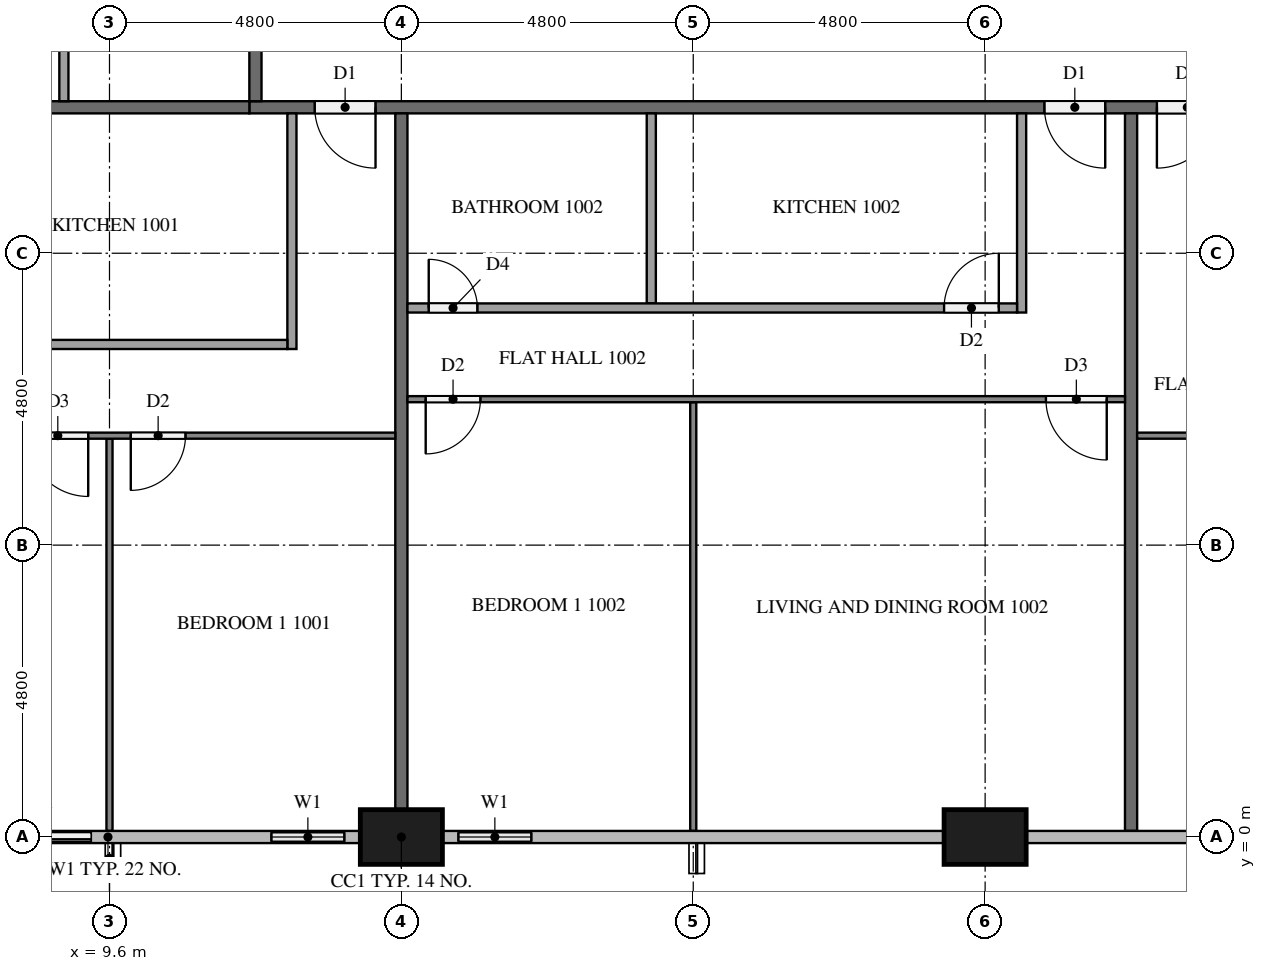
"""IFC4 building model, lengths in metres.
Left out: names, types, materials, properties, quantities, classifications, styles, units other than length and angle.
Written with IfcOpenShell. Run it as: python <this file> out.ifc"""

import sys

from ifc_helpers import new_model, si_unit, direction, frame, frame_2d, origin, origin_2d, place, context, subcontext, project, spatial, rectangle, extrude, element, fill, save


model = new_model("IFC4")
c1 = context("Model", 3, precision=1e-05, world=origin(), true_north=direction((0.0, 1.0)))
c2 = subcontext(c1, "Body", "Model", "MODEL_VIEW")
j1 = project(units=[si_unit("LENGTHUNIT", "METRE"), si_unit("PLANEANGLEUNIT", "RADIAN")], contexts=[c1])
p1 = place(None, origin())
s1 = spatial("IfcSite", under=j1, at=p1, CompositionType="ELEMENT")
p2 = place(p1, origin())
s2 = spatial("IfcBuilding", under=s1, at=p2, CompositionType="ELEMENT")
p3 = place(p2, frame((0.0, 0.0, 43.4)))
s3 = spatial("IfcBuildingStorey", under=s2, at=p3, CompositionType="ELEMENT", Elevation=43.4)
for number, where, z_axis, x_axis in (
    (1, (14.4, 0.0, 0.0), (0.0, 0.0, 1.0), (1.0, 0.0, 0.0)),
    (2, (24.0, 0.0, 0.0), (0.0, 0.0, 1.0), (1.0, 0.0, 0.0)),
):
    element("IfcColumn", number, at=place(p3, frame(where, z_axis=z_axis, x_axis=x_axis)), inside=s3, PredefinedType="COLUMN", context=c2, shape_type="SweptSolid", body=[
        extrude(rectangle(XDim=1.35, YDim=0.9, at=origin_2d()), origin(), (0.0, 0.0, 1.0), 3.2),
    ])
p4 = place(p3, frame((7.2, 0.0, 0.0), z_axis=(0.0, 0.0, 1.0), x_axis=(1.0, 0.0, 0.0)))
e3 = element("IfcWall", 3, at=p4, inside=s3, PredefinedType="SOLIDWALL", context=c2, shape_type="SweptSolid", body=[
    extrude(rectangle(XDim=2.4, YDim=0.15, at=frame_2d((1.2, 0.0))), origin(), (0.0, 0.0, 1.0), 3.2),
])
p5 = place(p4, frame((0.3, 0.0, 0.0)))
e4 = element("IfcOpeningElement", 4, at=p5, cuts=e3, PredefinedType="OPENING", context=c2, shape_type="SweptSolid", body=[
    extrude(rectangle(XDim=1.8, YDim=2.4, at=frame_2d((0.9, 1.2))), frame((0.0, 0.085, 0.0), z_axis=(0.0, -1.0, 0.0), x_axis=(1.0, 0.0, 0.0)), (0.0, 0.0, 1.0), 0.17),
])
p6 = place(p3, frame((12.0, 0.0, 0.0), z_axis=(0.0, 0.0, 1.0), x_axis=(1.0, 0.0, 0.0)))
e5 = element("IfcWall", 5, at=p6, inside=s3, PredefinedType="SOLIDWALL", context=c2, shape_type="SweptSolid", body=[
    extrude(rectangle(XDim=1.725, YDim=0.15, at=frame_2d((0.863, 0.0))), origin(), (0.0, 0.0, 1.0), 3.2),
])
p7 = place(p6, frame((0.262, 0.0, 0.9)))
e6 = element("IfcOpeningElement", 6, at=p7, cuts=e5, PredefinedType="OPENING", context=c2, shape_type="SweptSolid", body=[
    extrude(rectangle(XDim=1.2, YDim=1.4, at=frame_2d((0.6, 0.7))), frame((0.0, 0.085, 0.0), z_axis=(0.0, -1.0, 0.0), x_axis=(1.0, 0.0, 0.0)), (0.0, 0.0, 1.0), 0.17),
])
p8 = place(p3, frame((15.075, 0.0, 0.0), z_axis=(0.0, 0.0, 1.0), x_axis=(1.0, 0.0, 0.0)))
e7 = element("IfcWall", 7, at=p8, inside=s3, PredefinedType="SOLIDWALL", context=c2, shape_type="SweptSolid", body=[
    extrude(rectangle(XDim=1.725, YDim=0.15, at=frame_2d((0.863, 0.0))), origin(), (0.0, 0.0, 1.0), 3.2),
])
p9 = place(p8, frame((0.262, 0.0, 0.9)))
e8 = element("IfcOpeningElement", 8, at=p9, cuts=e7, PredefinedType="OPENING", context=c2, shape_type="SweptSolid", body=[
    extrude(rectangle(XDim=1.2, YDim=1.4, at=frame_2d((0.6, 0.7))), frame((0.0, 0.085, 0.0), z_axis=(0.0, -1.0, 0.0), x_axis=(1.0, 0.0, 0.0)), (0.0, 0.0, 1.0), 0.17),
])
p10 = place(p3, frame((50.5, 12.0, 0.0), z_axis=(0.0, 0.0, 1.0), x_axis=(-1.0, 0.0, 0.0)))
e9 = element("IfcWall", 9, at=p10, inside=s3, PredefinedType="PARTITIONING", context=c2, shape_type="SweptSolid", body=[
    extrude(rectangle(XDim=38.6, YDim=0.2, at=frame_2d((19.3, 0.0))), origin(), (0.0, 0.0, 1.0), 3.2),
])
p11 = place(p10, frame((36.525, 0.0, 0.0)))
e10 = element("IfcOpeningElement", 10, at=p11, cuts=e9, PredefinedType="OPENING", context=c2, shape_type="SweptSolid", body=[
    extrude(rectangle(XDim=1.0, YDim=2.1, at=frame_2d((0.5, 1.05))), frame((0.0, 0.11, 0.0), z_axis=(0.0, -1.0, 0.0), x_axis=(1.0, 0.0, 0.0)), (0.0, 0.0, 1.0), 0.22),
])
p12 = place(p10, frame((24.525, 0.0, 0.0)))
e11 = element("IfcOpeningElement", 11, at=p12, cuts=e9, PredefinedType="OPENING", context=c2, shape_type="SweptSolid", body=[
    extrude(rectangle(XDim=1.0, YDim=2.1, at=frame_2d((0.5, 1.05))), frame((0.0, 0.11, 0.0), z_axis=(0.0, -1.0, 0.0), x_axis=(1.0, 0.0, 0.0)), (0.0, 0.0, 1.0), 0.22),
])
p13 = place(p10, frame((22.675, 0.0, 0.0)))
e12 = element("IfcOpeningElement", 12, at=p13, cuts=e9, PredefinedType="OPENING", context=c2, shape_type="SweptSolid", body=[
    extrude(rectangle(XDim=1.0, YDim=2.1, at=frame_2d((0.5, 1.05))), frame((0.0, 0.11, 0.0), z_axis=(0.0, -1.0, 0.0), x_axis=(1.0, 0.0, 0.0)), (0.0, 0.0, 1.0), 0.22),
])
p14 = place(p10, frame((8.275, 0.0, 0.0)))
e13 = element("IfcOpeningElement", 13, at=p14, cuts=e9, PredefinedType="OPENING", context=c2, shape_type="SweptSolid", body=[
    extrude(rectangle(XDim=1.0, YDim=2.1, at=frame_2d((0.5, 1.05))), frame((0.0, 0.11, 0.0), z_axis=(0.0, -1.0, 0.0), x_axis=(1.0, 0.0, 0.0)), (0.0, 0.0, 1.0), 0.22),
])
p15 = place(p3, frame((12.0, 12.1, 0.0), z_axis=(0.0, 0.0, 1.0), x_axis=(0.0, 1.0, 0.0)))
e14 = element("IfcWall", 14, at=p15, inside=s3, PredefinedType="PARTITIONING", context=c2, shape_type="SweptSolid", body=[
    extrude(rectangle(XDim=28.6, YDim=0.2, at=frame_2d((14.3, 0.0))), origin(), (0.0, 0.0, 1.0), 3.2),
])
p16 = place(p15, frame((26.725, 0.0, 0.0)))
e15 = element("IfcOpeningElement", 15, at=p16, cuts=e14, PredefinedType="OPENING", context=c2, shape_type="SweptSolid", body=[
    extrude(rectangle(XDim=1.0, YDim=2.1, at=frame_2d((0.5, 1.05))), frame((0.0, 0.11, 0.0), z_axis=(0.0, -1.0, 0.0), x_axis=(1.0, 0.0, 0.0)), (0.0, 0.0, 1.0), 0.22),
])
p17 = place(p15, frame((17.125, 0.0, 0.0)))
e16 = element("IfcOpeningElement", 16, at=p17, cuts=e14, PredefinedType="OPENING", context=c2, shape_type="SweptSolid", body=[
    extrude(rectangle(XDim=1.0, YDim=2.1, at=frame_2d((0.5, 1.05))), frame((0.0, 0.11, 0.0), z_axis=(0.0, -1.0, 0.0), x_axis=(1.0, 0.0, 0.0)), (0.0, 0.0, 1.0), 0.22),
])
p18 = place(p15, frame((15.275, 0.0, 0.0)))
e17 = element("IfcOpeningElement", 17, at=p18, cuts=e14, PredefinedType="OPENING", context=c2, shape_type="SweptSolid", body=[
    extrude(rectangle(XDim=1.0, YDim=2.1, at=frame_2d((0.5, 1.05))), frame((0.0, 0.11, 0.0), z_axis=(0.0, -1.0, 0.0), x_axis=(1.0, 0.0, 0.0)), (0.0, 0.0, 1.0), 0.22),
])
p19 = place(p15, frame((5.675, 0.0, 0.0)))
e18 = element("IfcOpeningElement", 18, at=p19, cuts=e14, PredefinedType="OPENING", context=c2, shape_type="SweptSolid", body=[
    extrude(rectangle(XDim=1.0, YDim=2.1, at=frame_2d((0.5, 1.05))), frame((0.0, 0.11, 0.0), z_axis=(0.0, -1.0, 0.0), x_axis=(1.0, 0.0, 0.0)), (0.0, 0.0, 1.0), 0.22),
])
p20 = place(p3, frame((14.4, 11.9, 0.0), z_axis=(0.0, 0.0, 1.0), x_axis=(0.0, -1.0, 0.0)))
e19 = element("IfcWall", 19, at=p20, inside=s3, PredefinedType="PARTITIONING", context=c2, shape_type="SweptSolid", body=[
    extrude(rectangle(XDim=11.45, YDim=0.2, at=frame_2d((5.725, 0.0))), origin(), (0.0, 0.0, 1.0), 3.2),
])
for number, where, z_axis, x_axis in (
    (20, (0.1, 12.0, 0.0), (0.0, 0.0, 1.0), (1.0, 0.0, 0.0)),
    (21, (26.4, 11.9, 0.0), (0.0, 0.0, 1.0), (0.0, -1.0, 0.0)),
):
    element("IfcWall", number, at=place(p3, frame(where, z_axis=z_axis, x_axis=x_axis)), inside=s3, PredefinedType="PARTITIONING", context=c2, shape_type="SweptSolid", body=[
        extrude(rectangle(XDim=11.8, YDim=0.2, at=frame_2d((5.9, 0.0))), origin(), (0.0, 0.0, 1.0), 3.2),
    ])
p21 = place(p3, frame((9.6, 6.55, 0.0), z_axis=(0.0, 0.0, 1.0), x_axis=(0.0, -1.0, 0.0)))
e22 = element("IfcWall", 22, at=p21, inside=s3, PredefinedType="PARTITIONING", context=c2, shape_type="SweptSolid", body=[
    extrude(rectangle(XDim=6.45, YDim=0.1, at=frame_2d((3.225, 0.0))), origin(), (0.0, 0.0, 1.0), 3.2),
])
p22 = place(p3, frame((14.3, 6.6, 0.0), z_axis=(0.0, 0.0, 1.0), x_axis=(-1.0, 0.0, 0.0)))
e23 = element("IfcWall", 23, at=p22, inside=s3, PredefinedType="PARTITIONING", context=c2, shape_type="SweptSolid", body=[
    extrude(rectangle(XDim=14.2, YDim=0.1, at=frame_2d((7.1, 0.0))), origin(), (0.0, 0.0, 1.0), 3.2),
])
p23 = place(p22, frame((3.45, 0.0, 0.0)))
e24 = element("IfcOpeningElement", 24, at=p23, cuts=e23, PredefinedType="OPENING", context=c2, shape_type="SweptSolid", body=[
    extrude(rectangle(XDim=0.9, YDim=2.1, at=frame_2d((0.45, 1.05))), frame((0.0, 0.06, 0.0), z_axis=(0.0, -1.0, 0.0), x_axis=(1.0, 0.0, 0.0)), (0.0, 0.0, 1.0), 0.12),
])
p24 = place(p22, frame((5.05, 0.0, 0.0)))
e25 = element("IfcOpeningElement", 25, at=p24, cuts=e23, PredefinedType="OPENING", context=c2, shape_type="SweptSolid", body=[
    extrude(rectangle(XDim=1.0, YDim=2.1, at=frame_2d((0.5, 1.05))), frame((0.0, 0.06, 0.0), z_axis=(0.0, -1.0, 0.0), x_axis=(1.0, 0.0, 0.0)), (0.0, 0.0, 1.0), 0.12),
])
p25 = place(p22, frame((12.7, 0.0, 0.0)))
e26 = element("IfcOpeningElement", 26, at=p25, cuts=e23, PredefinedType="OPENING", context=c2, shape_type="SweptSolid", body=[
    extrude(rectangle(XDim=0.9, YDim=2.1, at=frame_2d((0.45, 1.05))), frame((0.0, 0.06, 0.0), z_axis=(0.0, -1.0, 0.0), x_axis=(1.0, 0.0, 0.0)), (0.0, 0.0, 1.0), 0.12),
])
p26 = place(p3, frame((12.6, 11.9, 0.0), z_axis=(0.0, 0.0, 1.0), x_axis=(0.0, -1.0, 0.0)))
e27 = element("IfcWall", 27, at=p26, inside=s3, PredefinedType="PARTITIONING", context=c2, shape_type="SweptSolid", body=[
    extrude(rectangle(XDim=3.875, YDim=0.15, at=frame_2d((1.938, 0.0))), origin(), (0.0, 0.0, 1.0), 3.2),
])
p27 = place(p3, frame((0.1, 8.1, 0.0), z_axis=(0.0, 0.0, 1.0), x_axis=(1.0, 0.0, 0.0)))
e28 = element("IfcWall", 28, at=p27, inside=s3, PredefinedType="PARTITIONING", context=c2, shape_type="SweptSolid", body=[
    extrude(rectangle(XDim=12.425, YDim=0.15, at=frame_2d((6.212, 0.0))), origin(), (0.0, 0.0, 1.0), 3.2),
])
p28 = place(p27, frame((7.015, 0.0, 0.0)))
e29 = element("IfcOpeningElement", 29, at=p28, cuts=e28, PredefinedType="OPENING", context=c2, shape_type="SweptSolid", body=[
    extrude(rectangle(XDim=0.9, YDim=2.1, at=frame_2d((0.45, 1.05))), frame((0.0, 0.085, 0.0), z_axis=(0.0, -1.0, 0.0), x_axis=(1.0, 0.0, 0.0)), (0.0, 0.0, 1.0), 0.17),
])
p29 = place(p27, frame((5.465, 0.0, 0.0)))
e30 = element("IfcOpeningElement", 30, at=p29, cuts=e28, PredefinedType="OPENING", context=c2, shape_type="SweptSolid", body=[
    extrude(rectangle(XDim=0.9, YDim=2.1, at=frame_2d((0.45, 1.05))), frame((0.0, 0.085, 0.0), z_axis=(0.0, -1.0, 0.0), x_axis=(1.0, 0.0, 0.0)), (0.0, 0.0, 1.0), 0.17),
])
p30 = place(p27, frame((0.35, 0.0, 0.0)))
e31 = element("IfcOpeningElement", 31, at=p30, cuts=e28, PredefinedType="OPENING", context=c2, shape_type="SweptSolid", body=[
    extrude(rectangle(XDim=0.8, YDim=2.1, at=frame_2d((0.4, 1.05))), frame((0.0, 0.085, 0.0), z_axis=(0.0, -1.0, 0.0), x_axis=(1.0, 0.0, 0.0)), (0.0, 0.0, 1.0), 0.17),
])
p31 = place(p3, frame((19.2, 7.15, 0.0), z_axis=(0.0, 0.0, 1.0), x_axis=(0.0, -1.0, 0.0)))
e32 = element("IfcWall", 32, at=p31, inside=s3, PredefinedType="PARTITIONING", context=c2, shape_type="SweptSolid", body=[
    extrude(rectangle(XDim=7.05, YDim=0.1, at=frame_2d((3.525, 0.0))), origin(), (0.0, 0.0, 1.0), 3.2),
])
p32 = place(p3, frame((26.3, 7.2, 0.0), z_axis=(0.0, 0.0, 1.0), x_axis=(-1.0, 0.0, 0.0)))
e33 = element("IfcWall", 33, at=p32, inside=s3, PredefinedType="PARTITIONING", context=c2, shape_type="SweptSolid", body=[
    extrude(rectangle(XDim=11.8, YDim=0.1, at=frame_2d((5.9, 0.0))), origin(), (0.0, 0.0, 1.0), 3.2),
])
p33 = place(p32, frame((0.3, 0.0, 0.0)))
e34 = element("IfcOpeningElement", 34, at=p33, cuts=e33, PredefinedType="OPENING", context=c2, shape_type="SweptSolid", body=[
    extrude(rectangle(XDim=1.0, YDim=2.1, at=frame_2d((0.5, 1.05))), frame((0.0, 0.06, 0.0), z_axis=(0.0, -1.0, 0.0), x_axis=(1.0, 0.0, 0.0)), (0.0, 0.0, 1.0), 0.12),
])
p34 = place(p32, frame((10.6, 0.0, 0.0)))
e35 = element("IfcOpeningElement", 35, at=p34, cuts=e33, PredefinedType="OPENING", context=c2, shape_type="SweptSolid", body=[
    extrude(rectangle(XDim=0.9, YDim=2.1, at=frame_2d((0.45, 1.05))), frame((0.0, 0.06, 0.0), z_axis=(0.0, -1.0, 0.0), x_axis=(1.0, 0.0, 0.0)), (0.0, 0.0, 1.0), 0.12),
])
p35 = place(p3, frame((18.51, 11.9, 0.0), z_axis=(0.0, 0.0, 1.0), x_axis=(0.0, -1.0, 0.0)))
e36 = element("IfcWall", 36, at=p35, inside=s3, PredefinedType="PARTITIONING", context=c2, shape_type="SweptSolid", body=[
    extrude(rectangle(XDim=3.125, YDim=0.15, at=frame_2d((1.562, 0.0))), origin(), (0.0, 0.0, 1.0), 3.2),
])
p36 = place(p3, frame((24.6, 11.9, 0.0), z_axis=(0.0, 0.0, 1.0), x_axis=(0.0, -1.0, 0.0)))
e37 = element("IfcWall", 37, at=p36, inside=s3, PredefinedType="PARTITIONING", context=c2, shape_type="SweptSolid", body=[
    extrude(rectangle(XDim=3.275, YDim=0.15, at=frame_2d((1.637, 0.0))), origin(), (0.0, 0.0, 1.0), 3.2),
])
p37 = place(p3, frame((14.5, 8.7, 0.0), z_axis=(0.0, 0.0, 1.0), x_axis=(1.0, 0.0, 0.0)))
e38 = element("IfcWall", 38, at=p37, inside=s3, PredefinedType="PARTITIONING", context=c2, shape_type="SweptSolid", body=[
    extrude(rectangle(XDim=10.025, YDim=0.15, at=frame_2d((5.012, 0.0))), origin(), (0.0, 0.0, 1.0), 3.2),
])
p38 = place(p37, frame((8.825, 0.0, 0.0)))
e39 = element("IfcOpeningElement", 39, at=p38, cuts=e38, PredefinedType="OPENING", context=c2, shape_type="SweptSolid", body=[
    extrude(rectangle(XDim=0.9, YDim=2.1, at=frame_2d((0.45, 1.05))), frame((0.0, 0.085, 0.0), z_axis=(0.0, -1.0, 0.0), x_axis=(1.0, 0.0, 0.0)), (0.0, 0.0, 1.0), 0.17),
])
p39 = place(p37, frame((0.35, 0.0, 0.0)))
e40 = element("IfcOpeningElement", 40, at=p39, cuts=e38, PredefinedType="OPENING", context=c2, shape_type="SweptSolid", body=[
    extrude(rectangle(XDim=0.8, YDim=2.1, at=frame_2d((0.4, 1.05))), frame((0.0, 0.085, 0.0), z_axis=(0.0, -1.0, 0.0), x_axis=(1.0, 0.0, 0.0)), (0.0, 0.0, 1.0), 0.17),
])
p40 = place(p3, frame((40.7, 6.6, 0.0), z_axis=(0.0, 0.0, 1.0), x_axis=(-1.0, 0.0, 0.0)))
e41 = element("IfcWall", 41, at=p40, inside=s3, PredefinedType="PARTITIONING", context=c2, shape_type="SweptSolid", body=[
    extrude(rectangle(XDim=14.2, YDim=0.1, at=frame_2d((7.1, 0.0))), origin(), (0.0, 0.0, 1.0), 3.2),
])
p41 = place(p40, frame((9.85, 0.0, 0.0)))
e42 = element("IfcOpeningElement", 42, at=p41, cuts=e41, PredefinedType="OPENING", context=c2, shape_type="SweptSolid", body=[
    extrude(rectangle(XDim=0.9, YDim=2.1, at=frame_2d((0.45, 1.05))), frame((0.0, 0.06, 0.0), z_axis=(0.0, -1.0, 0.0), x_axis=(1.0, 0.0, 0.0)), (0.0, 0.0, 1.0), 0.12),
])
p42 = place(p40, frame((8.25, 0.0, 0.0)))
e43 = element("IfcOpeningElement", 43, at=p42, cuts=e41, PredefinedType="OPENING", context=c2, shape_type="SweptSolid", body=[
    extrude(rectangle(XDim=0.9, YDim=2.1, at=frame_2d((0.45, 1.05))), frame((0.0, 0.06, 0.0), z_axis=(0.0, -1.0, 0.0), x_axis=(1.0, 0.0, 0.0)), (0.0, 0.0, 1.0), 0.12),
])
p43 = place(p40, frame((0.3, 0.0, 0.0)))
e44 = element("IfcOpeningElement", 44, at=p43, cuts=e41, PredefinedType="OPENING", context=c2, shape_type="SweptSolid", body=[
    extrude(rectangle(XDim=1.0, YDim=2.1, at=frame_2d((0.5, 1.05))), frame((0.0, 0.06, 0.0), z_axis=(0.0, -1.0, 0.0), x_axis=(1.0, 0.0, 0.0)), (0.0, 0.0, 1.0), 0.12),
])
p44 = place(p3, frame((8.85, 17.325, 0.0), z_axis=(0.0, 0.0, 1.0), x_axis=(0.0, -1.0, 0.0)))
e45 = element("IfcWall", 45, at=p44, inside=s3, PredefinedType="PARTITIONING", context=c2, shape_type="SweptSolid", body=[
    extrude(rectangle(XDim=5.225, YDim=0.15, at=frame_2d((2.612, 0.0))), origin(), (0.0, 0.0, 1.0), 3.2),
])
p45 = place(p44, frame((0.965, 0.0, 0.0)))
e46 = element("IfcOpeningElement", 46, at=p45, cuts=e45, PredefinedType="OPENING", context=c2, shape_type="SweptSolid", body=[
    extrude(rectangle(XDim=0.8, YDim=2.1, at=frame_2d((0.4, 1.05))), frame((0.0, 0.085, 0.0), z_axis=(0.0, -1.0, 0.0), x_axis=(1.0, 0.0, 0.0)), (0.0, 0.0, 1.0), 0.17),
])
p46 = place(p44, frame((2.415, 0.0, 0.0)))
e47 = element("IfcOpeningElement", 47, at=p46, cuts=e45, PredefinedType="OPENING", context=c2, shape_type="SweptSolid", body=[
    extrude(rectangle(XDim=0.9, YDim=2.1, at=frame_2d((0.45, 1.05))), frame((0.0, 0.085, 0.0), z_axis=(0.0, -1.0, 0.0), x_axis=(1.0, 0.0, 0.0)), (0.0, 0.0, 1.0), 0.17),
])
p47 = place(p5, origin())
e48 = element("IfcDoor", 48, at=p47, inside=s3, OperationType="SLIDING_TO_LEFT", PredefinedType="DOOR", context=c2, shape_type="SweptSolid", body=[
    extrude(rectangle(XDim=1.8, YDim=2.4, at=frame_2d((0.9, 1.2))), frame((0.0, 0.025, 0.0), z_axis=(0.0, -1.0, 0.0), x_axis=(1.0, 0.0, 0.0)), (0.0, 0.0, 1.0), 0.05),
])
fill(e4, e48)
p48 = place(p7, origin())
e49 = element("IfcWindow", 49, at=p48, inside=s3, PartitioningType="SINGLE_PANEL", PredefinedType="WINDOW", context=c2, shape_type="SweptSolid", body=[
    extrude(rectangle(XDim=1.2, YDim=1.4, at=frame_2d((0.6, 0.7))), frame((0.0, 0.03, 0.0), z_axis=(0.0, -1.0, 0.0), x_axis=(1.0, 0.0, 0.0)), (0.0, 0.0, 1.0), 0.06),
])
fill(e6, e49)
p49 = place(p9, origin())
e50 = element("IfcWindow", 50, at=p49, inside=s3, PartitioningType="SINGLE_PANEL", PredefinedType="WINDOW", context=c2, shape_type="SweptSolid", body=[
    extrude(rectangle(XDim=1.2, YDim=1.4, at=frame_2d((0.6, 0.7))), frame((0.0, 0.03, 0.0), z_axis=(0.0, -1.0, 0.0), x_axis=(1.0, 0.0, 0.0)), (0.0, 0.0, 1.0), 0.06),
])
fill(e8, e50)
p50 = place(p11, origin())
e51 = element("IfcDoor", 51, at=p50, inside=s3, OperationType="SINGLE_SWING_LEFT", PredefinedType="DOOR", context=c2, shape_type="SweptSolid", body=[
    extrude(rectangle(XDim=1.0, YDim=2.1, at=frame_2d((0.5, 1.05))), frame((0.0, 0.025, 0.0), z_axis=(0.0, -1.0, 0.0), x_axis=(1.0, 0.0, 0.0)), (0.0, 0.0, 1.0), 0.05),
])
fill(e10, e51)
p51 = place(p12, origin())
e52 = element("IfcDoor", 52, at=p51, inside=s3, OperationType="SINGLE_SWING_LEFT", PredefinedType="DOOR", context=c2, shape_type="SweptSolid", body=[
    extrude(rectangle(XDim=1.0, YDim=2.1, at=frame_2d((0.5, 1.05))), frame((0.0, 0.025, 0.0), z_axis=(0.0, -1.0, 0.0), x_axis=(1.0, 0.0, 0.0)), (0.0, 0.0, 1.0), 0.05),
])
fill(e11, e52)
p52 = place(p13, origin())
e53 = element("IfcDoor", 53, at=p52, inside=s3, OperationType="SINGLE_SWING_RIGHT", PredefinedType="DOOR", context=c2, shape_type="SweptSolid", body=[
    extrude(rectangle(XDim=1.0, YDim=2.1, at=frame_2d((0.5, 1.05))), frame((0.0, 0.025, 0.0), z_axis=(0.0, -1.0, 0.0), x_axis=(1.0, 0.0, 0.0)), (0.0, 0.0, 1.0), 0.05),
])
fill(e12, e53)
p53 = place(p23, origin())
e54 = element("IfcDoor", 54, at=p53, inside=s3, OperationType="SINGLE_SWING_RIGHT", PredefinedType="DOOR", context=c2, shape_type="SweptSolid", body=[
    extrude(rectangle(XDim=0.9, YDim=2.1, at=frame_2d((0.45, 1.05))), frame((0.0, 0.025, 0.0), z_axis=(0.0, -1.0, 0.0), x_axis=(1.0, 0.0, 0.0)), (0.0, 0.0, 1.0), 0.05),
])
fill(e24, e54)
p54 = place(p24, origin())
e55 = element("IfcDoor", 55, at=p54, inside=s3, OperationType="SINGLE_SWING_LEFT", PredefinedType="DOOR", context=c2, shape_type="SweptSolid", body=[
    extrude(rectangle(XDim=1.0, YDim=2.1, at=frame_2d((0.5, 1.05))), frame((0.0, 0.025, 0.0), z_axis=(0.0, -1.0, 0.0), x_axis=(1.0, 0.0, 0.0)), (0.0, 0.0, 1.0), 0.05),
])
fill(e25, e55)
p55 = place(p33, origin())
e56 = element("IfcDoor", 56, at=p55, inside=s3, OperationType="SINGLE_SWING_LEFT", PredefinedType="DOOR", context=c2, shape_type="SweptSolid", body=[
    extrude(rectangle(XDim=1.0, YDim=2.1, at=frame_2d((0.5, 1.05))), frame((0.0, 0.025, 0.0), z_axis=(0.0, -1.0, 0.0), x_axis=(1.0, 0.0, 0.0)), (0.0, 0.0, 1.0), 0.05),
])
fill(e34, e56)
p56 = place(p34, origin())
e57 = element("IfcDoor", 57, at=p56, inside=s3, OperationType="SINGLE_SWING_RIGHT", PredefinedType="DOOR", context=c2, shape_type="SweptSolid", body=[
    extrude(rectangle(XDim=0.9, YDim=2.1, at=frame_2d((0.45, 1.05))), frame((0.0, 0.025, 0.0), z_axis=(0.0, -1.0, 0.0), x_axis=(1.0, 0.0, 0.0)), (0.0, 0.0, 1.0), 0.05),
])
fill(e35, e57)
p57 = place(p38, origin())
e58 = element("IfcDoor", 58, at=p57, inside=s3, OperationType="SINGLE_SWING_RIGHT", PredefinedType="DOOR", context=c2, shape_type="SweptSolid", body=[
    extrude(rectangle(XDim=0.9, YDim=2.1, at=frame_2d((0.45, 1.05))), frame((0.0, 0.025, 0.0), z_axis=(0.0, -1.0, 0.0), x_axis=(1.0, 0.0, 0.0)), (0.0, 0.0, 1.0), 0.05),
])
fill(e39, e58)
p58 = place(p39, origin())
e59 = element("IfcDoor", 59, at=p58, inside=s3, OperationType="SINGLE_SWING_LEFT", PredefinedType="DOOR", context=c2, shape_type="SweptSolid", body=[
    extrude(rectangle(XDim=0.8, YDim=2.1, at=frame_2d((0.4, 1.05))), frame((0.0, 0.025, 0.0), z_axis=(0.0, -1.0, 0.0), x_axis=(1.0, 0.0, 0.0)), (0.0, 0.0, 1.0), 0.05),
])
fill(e40, e59)
save(model, sys.argv[1])
